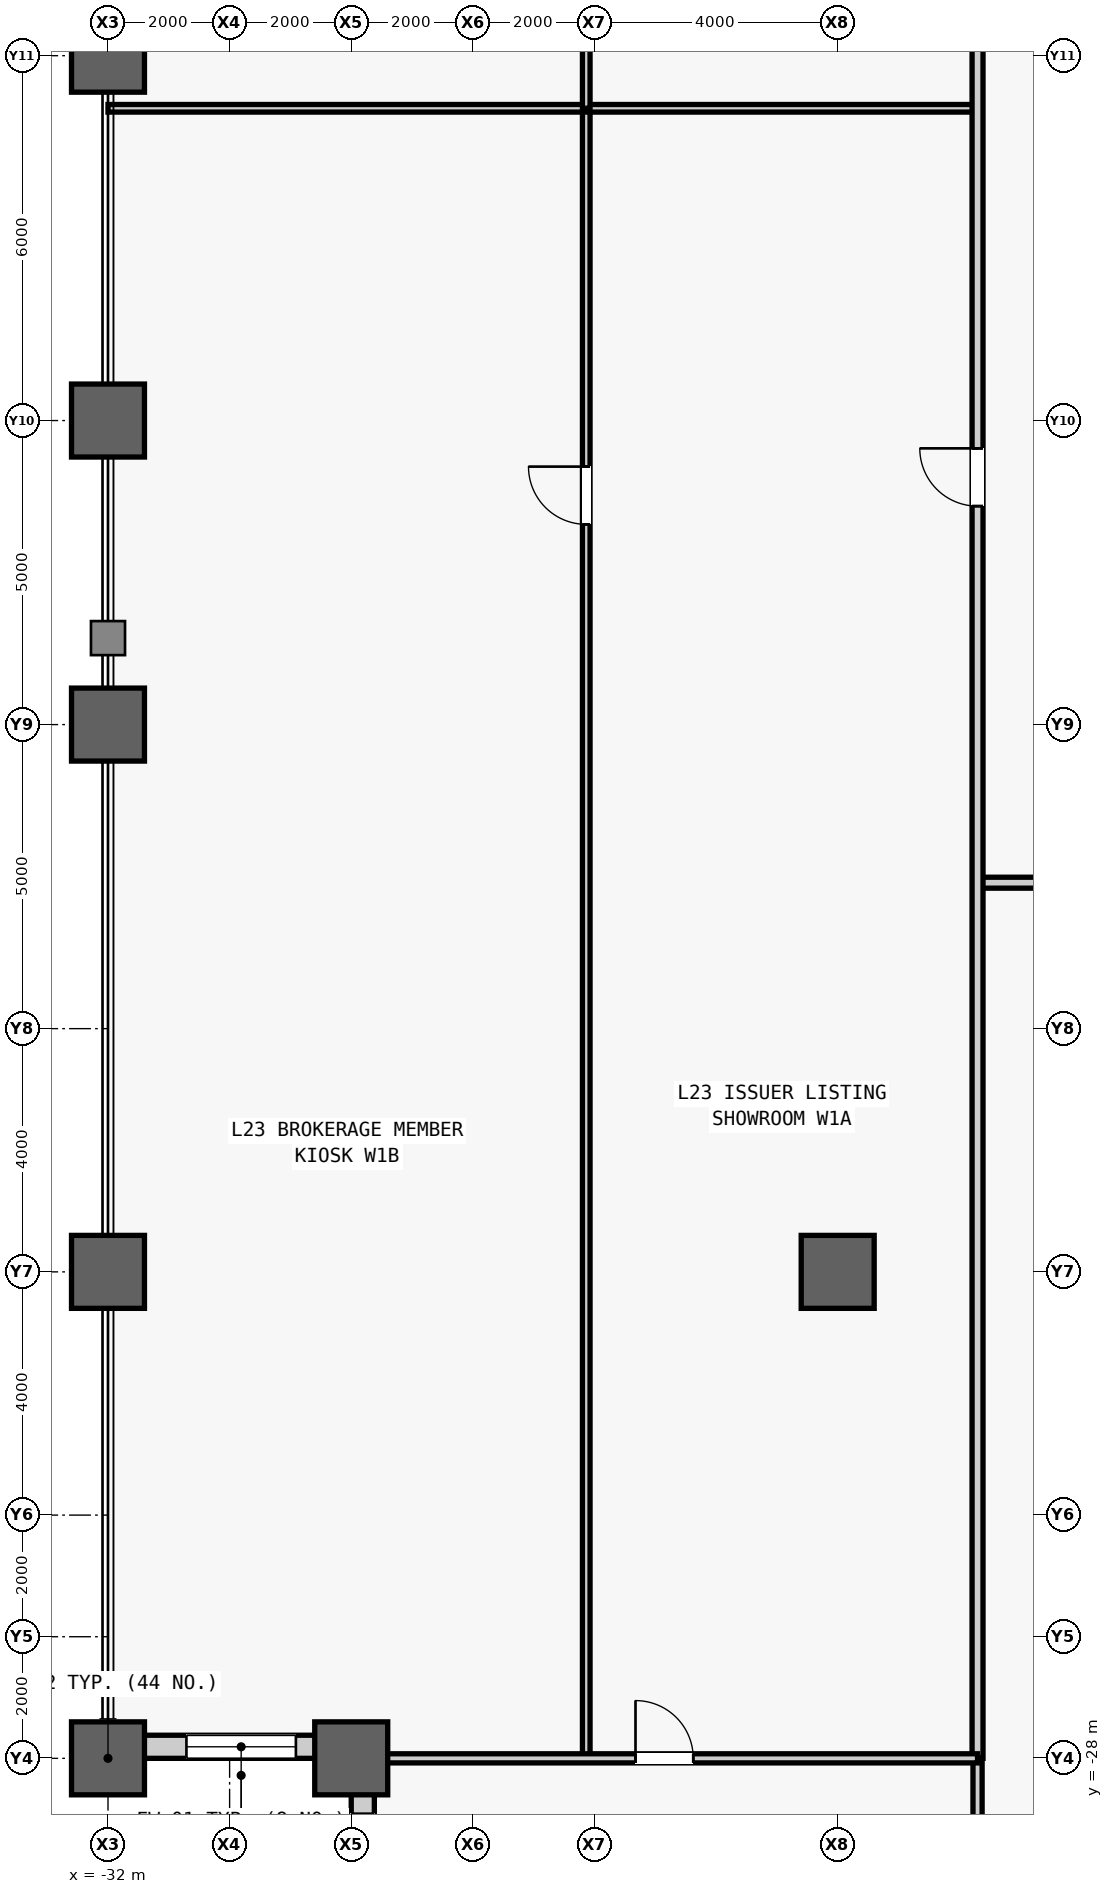
"""IFC4 building model, lengths in metres.
Left out: names, types, materials, properties, quantities, classifications, styles, units other than length and angle.
Written with IfcOpenShell. Run it as: python <this file> out.ifc"""

import sys

from ifc_helpers import new_model, si_unit, direction, frame, frame_2d, origin, origin_2d, place, context, subcontext, project, spatial, rectangle, hollow_rectangle, extrude, source, transform, mapped, element, fill, save


model = new_model("IFC4")
c1 = context("Model", 3, precision=1e-05, world=origin(), true_north=direction((0.0, 1.0)))
c2 = subcontext(c1, "Body", "Model", "MODEL_VIEW")
j1 = project(units=[si_unit("LENGTHUNIT", "METRE"), si_unit("PLANEANGLEUNIT", "RADIAN")], contexts=[c1])
p1 = place(None, origin())
s1 = spatial("IfcSite", under=j1, at=p1, CompositionType="ELEMENT")
p2 = place(p1, origin())
s2 = spatial("IfcBuilding", under=s1, at=p2, CompositionType="ELEMENT")
p3 = place(p2, frame((0.0, 0.0, 103.7)))
s3 = spatial("IfcBuildingStorey", under=s2, at=p3, CompositionType="ELEMENT", Elevation=103.7)
m1 = source(origin(), c2, "Body", "SweptSolid", [
    extrude(hollow_rectangle(XDim=1.2, YDim=1.2, WallThickness=0.07, at=origin_2d()), origin(), (0.0, 0.0, 1.0), 4.1),
])
for number, where, z_axis, x_axis in (
    (1, (-32.0, -28.0, 0.0), (0.0, 0.0, 1.0), (1.0, 0.0, 0.0)),
    (2, (-32.0, -20.0, 0.0), (0.0, 0.0, 1.0), (1.0, 0.0, 0.0)),
    (3, (-32.0, -11.0, 0.0), (0.0, 0.0, 1.0), (1.0, 0.0, 0.0)),
    (4, (-32.0, -6.0, 0.0), (0.0, 0.0, 1.0), (1.0, 0.0, 0.0)),
    (5, (-32.0, 0.0, 0.0), (0.0, 0.0, 1.0), (1.0, 0.0, 0.0)),
    (6, (-28.0, -28.0, 0.0), (0.0, 0.0, 1.0), (1.0, 0.0, 0.0)),
    (7, (-20.0, -20.0, 0.0), (0.0, 0.0, 1.0), (1.0, 0.0, 0.0)),
):
    element("IfcColumn", number, at=place(p3, frame(where, z_axis=z_axis, x_axis=x_axis)), inside=s3, PredefinedType="COLUMN", context=c2, shape_type="MappedRepresentation", body=[
        mapped(m1, transform((0.0, 0.0, 0.0), scale=1.0)),
    ])
m2 = source(origin(), c2, "Body", "SweptSolid", [
    extrude(rectangle(XDim=3.62, YDim=0.38, at=frame_2d((1.81, 0.0))), origin(), (0.0, 0.0, 1.0), 3.145),
])
p4 = place(p3, frame((-28.0, -27.81, 0.0), z_axis=(0.0, 0.0, 1.0), x_axis=(-1.0, 0.0, 0.0)))
e8 = element("IfcWall", 8, at=p4, inside=s3, PredefinedType="STANDARD", context=c2, shape_type="MappedRepresentation", body=[
    mapped(m2, transform((0.0, 0.0, 0.0), scale=1.0)),
])
m3 = source(origin(), c2, "Body", "SweptSolid", [
    extrude(rectangle(XDim=1.8, YDim=2.4, at=frame_2d((0.9, 1.2))), frame((0.0, 0.2, 0.0), z_axis=(0.0, -1.0, 0.0), x_axis=(1.0, 0.0, 0.0)), (0.0, 0.0, 1.0), 0.4),
])
p5 = place(p4, frame((0.91, 0.0, 0.5)))
e9 = element("IfcOpeningElement", 9, at=p5, cuts=e8, PredefinedType="OPENING", context=c2, shape_type="MappedRepresentation", body=[
    mapped(m3, transform((0.0, 0.0, 0.0), scale=1.0)),
])
p6 = place(p3, frame((-27.81, -31.62, 0.0), z_axis=(0.0, 0.0, 1.0), x_axis=(0.0, 1.0, 0.0)))
e10 = element("IfcWall", 10, at=p6, inside=s3, PredefinedType="STANDARD", context=c2, shape_type="MappedRepresentation", body=[
    mapped(m2, transform((0.0, 0.0, 0.0), scale=1.0)),
])
p7 = place(p6, frame((0.91, 0.0, 0.5)))
e11 = element("IfcOpeningElement", 11, at=p7, cuts=e10, PredefinedType="OPENING", context=c2, shape_type="MappedRepresentation", body=[
    mapped(m3, transform((0.0, 0.0, 0.0), scale=1.0)),
])
m4 = source(origin(), c2, "Body", "SweptSolid", [
    extrude(rectangle(XDim=36.25, YDim=0.18, at=frame_2d((18.125, 0.0))), origin(), (0.0, 0.0, 1.0), 3.84),
])
p8 = place(p3, frame((-17.7, -13.6, 0.0), z_axis=(0.0, 0.0, 1.0), x_axis=(1.0, 0.0, 0.0)))
e12 = element("IfcWall", 12, at=p8, inside=s3, PredefinedType="PARTITIONING", context=c2, shape_type="MappedRepresentation", body=[
    mapped(m4, transform((0.0, 0.0, 0.0), scale=1.0)),
])
m5 = source(origin(), c2, "Body", "SweptSolid", [
    extrude(rectangle(XDim=1.05, YDim=2.2, at=frame_2d((0.525, 1.1))), frame((0.0, 0.1, 0.0), z_axis=(0.0, -1.0, 0.0), x_axis=(1.0, 0.0, 0.0)), (0.0, 0.0, 1.0), 0.2),
])
p9 = place(p8, frame((6.925, 0.0, 0.0)))
e13 = element("IfcOpeningElement", 13, at=p9, cuts=e12, PredefinedType="OPENING", context=c2, shape_type="MappedRepresentation", body=[
    mapped(m5, transform((0.0, 0.0, 0.0), scale=1.0)),
])
p10 = place(p8, frame((17.6, 0.0, 0.0)))
e14 = element("IfcOpeningElement", 14, at=p10, cuts=e12, PredefinedType="OPENING", context=c2, shape_type="MappedRepresentation", body=[
    mapped(m5, transform((0.0, 0.0, 0.0), scale=1.0)),
])
p11 = place(p8, frame((27.85, 0.0, 0.0)))
e15 = element("IfcOpeningElement", 15, at=p11, cuts=e12, PredefinedType="OPENING", context=c2, shape_type="MappedRepresentation", body=[
    mapped(m5, transform((0.0, 0.0, 0.0), scale=1.0)),
])
m6 = source(origin(), c2, "Body", "SweptSolid", [
    extrude(rectangle(XDim=4.0, YDim=0.15, at=frame_2d((2.0, 0.0))), origin(), (0.0, 0.0, 1.0), 3.84),
])
p12 = place(p3, frame((-17.7, -32.0, 0.0), z_axis=(0.0, 0.0, 1.0), x_axis=(0.0, 1.0, 0.0)))
e16 = element("IfcWall", 16, at=p12, inside=s3, PredefinedType="PARTITIONING", context=c2, shape_type="MappedRepresentation", body=[
    mapped(m6, transform((0.0, 0.0, 0.0), scale=1.0)),
])
m7 = source(origin(), c2, "Body", "SweptSolid", [
    extrude(rectangle(XDim=27.135, YDim=0.125, at=frame_2d((13.567, 0.0))), origin(), (0.0, 0.0, 1.0), 3.84),
])
p13 = place(p3, frame((-24.135, -28.0, 0.0), z_axis=(0.0, 0.0, 1.0), x_axis=(0.0, 1.0, 0.0)))
e17 = element("IfcWall", 17, at=p13, inside=s3, PredefinedType="PARTITIONING", context=c2, shape_type="MappedRepresentation", body=[
    mapped(m7, transform((0.0, 0.0, 0.0), scale=1.0)),
])
m8 = source(origin(), c2, "Body", "SweptSolid", [
    extrude(rectangle(XDim=0.95, YDim=2.15, at=frame_2d((0.475, 1.075))), frame((0.0, 0.073, 0.0), z_axis=(0.0, -1.0, 0.0), x_axis=(1.0, 0.0, 0.0)), (0.0, 0.0, 1.0), 0.145),
])
p14 = place(p13, frame((20.292, 0.0, 0.0)))
e18 = element("IfcOpeningElement", 18, at=p14, cuts=e17, PredefinedType="OPENING", context=c2, shape_type="MappedRepresentation", body=[
    mapped(m8, transform((0.0, 0.0, 0.0), scale=1.0)),
])
m9 = source(origin(), c2, "Body", "SweptSolid", [
    extrude(rectangle(XDim=14.3, YDim=0.125, at=frame_2d((7.15, 0.0))), origin(), (0.0, 0.0, 1.0), 3.84),
])
p15 = place(p3, frame((-32.0, -0.865, 0.0), z_axis=(0.0, 0.0, 1.0), x_axis=(1.0, 0.0, 0.0)))
e19 = element("IfcWall", 19, at=p15, inside=s3, PredefinedType="PARTITIONING", context=c2, shape_type="MappedRepresentation", body=[
    mapped(m9, transform((0.0, 0.0, 0.0), scale=1.0)),
])
m10 = source(origin(), c2, "Body", "SweptSolid", [
    extrude(rectangle(XDim=28.865, YDim=0.125, at=frame_2d((14.433, 0.0))), origin(), (0.0, 0.0, 1.0), 3.84),
])
p16 = place(p3, frame((-24.135, -0.865, 0.0), z_axis=(0.0, 0.0, 1.0), x_axis=(0.0, 1.0, 0.0)))
e20 = element("IfcWall", 20, at=p16, inside=s3, PredefinedType="PARTITIONING", context=c2, shape_type="MappedRepresentation", body=[
    mapped(m10, transform((0.0, 0.0, 0.0), scale=1.0)),
])
p17 = place(p16, frame((7.308, 0.0, 0.0)))
e21 = element("IfcOpeningElement", 21, at=p17, cuts=e20, PredefinedType="OPENING", context=c2, shape_type="MappedRepresentation", body=[
    mapped(m8, transform((0.0, 0.0, 0.0), scale=1.0)),
])
m11 = source(origin(), c2, "Body", "SweptSolid", [
    extrude(rectangle(XDim=56.0, YDim=0.18, at=frame_2d((28.0, 0.0))), origin(), (0.0, 0.0, 1.0), 3.84),
])
p18 = place(p3, frame((-17.7, -28.0, 0.0), z_axis=(0.0, 0.0, 1.0), x_axis=(0.0, 1.0, 0.0)))
e22 = element("IfcWall", 22, at=p18, inside=s3, PredefinedType="PARTITIONING", context=c2, shape_type="MappedRepresentation", body=[
    mapped(m11, transform((0.0, 0.0, 0.0), scale=1.0)),
])
m12 = source(origin(), c2, "Body", "SweptSolid", [
    extrude(rectangle(XDim=0.95, YDim=2.15, at=frame_2d((0.475, 1.075))), frame((0.0, 0.1, 0.0), z_axis=(0.0, -1.0, 0.0), x_axis=(1.0, 0.0, 0.0)), (0.0, 0.0, 1.0), 0.2),
])
p19 = place(p18, frame((20.593, 0.0, 0.0)))
e23 = element("IfcOpeningElement", 23, at=p19, cuts=e22, PredefinedType="OPENING", context=c2, shape_type="MappedRepresentation", body=[
    mapped(m12, transform((0.0, 0.0, 0.0), scale=1.0)),
])
p20 = place(p18, frame((34.143, 0.0, 0.0)))
e24 = element("IfcOpeningElement", 24, at=p20, cuts=e22, PredefinedType="OPENING", context=c2, shape_type="MappedRepresentation", body=[
    mapped(m12, transform((0.0, 0.0, 0.0), scale=1.0)),
])
m13 = source(origin(), c2, "Body", "SweptSolid", [
    extrude(rectangle(XDim=10.3, YDim=0.15, at=frame_2d((5.15, 0.0))), origin(), (0.0, 0.0, 1.0), 3.84),
])
p21 = place(p3, frame((-28.0, -28.0, 0.0), z_axis=(0.0, 0.0, 1.0), x_axis=(1.0, 0.0, 0.0)))
e25 = element("IfcWall", 25, at=p21, inside=s3, PredefinedType="PARTITIONING", context=c2, shape_type="MappedRepresentation", body=[
    mapped(m13, transform((0.0, 0.0, 0.0), scale=1.0)),
])
m14 = source(origin(), c2, "Body", "SweptSolid", [
    extrude(rectangle(XDim=0.95, YDim=2.15, at=frame_2d((0.475, 1.075))), frame((0.0, 0.085, 0.0), z_axis=(0.0, -1.0, 0.0), x_axis=(1.0, 0.0, 0.0)), (0.0, 0.0, 1.0), 0.17),
])
p22 = place(p21, frame((4.675, 0.0, 0.0)))
e26 = element("IfcOpeningElement", 26, at=p22, cuts=e25, PredefinedType="OPENING", context=c2, shape_type="MappedRepresentation", body=[
    mapped(m14, transform((0.0, 0.0, 0.0), scale=1.0)),
])
m15 = source(origin(), c2, "Body", "SweptSolid", [
    extrude(rectangle(XDim=1.8, YDim=2.4, at=frame_2d((0.9, 1.2))), frame((0.0, 0.03, 0.0), z_axis=(0.0, -1.0, 0.0), x_axis=(1.0, 0.0, 0.0)), (0.0, 0.0, 1.0), 0.06),
])
p23 = place(p5, origin())
e27 = element("IfcWindow", 27, at=p23, inside=s3, PartitioningType="SINGLE_PANEL", PredefinedType="WINDOW", context=c2, shape_type="MappedRepresentation", body=[
    mapped(m15, transform((0.0, 0.0, 0.0), scale=1.0)),
])
fill(e9, e27)
p24 = place(p7, origin())
e28 = element("IfcWindow", 28, at=p24, inside=s3, PartitioningType="SINGLE_PANEL", PredefinedType="WINDOW", context=c2, shape_type="MappedRepresentation", body=[
    mapped(m15, transform((0.0, 0.0, 0.0), scale=1.0)),
])
fill(e11, e28)
m16 = source(origin(), c2, "Body", "SweptSolid", [
    extrude(rectangle(XDim=0.95, YDim=2.15, at=frame_2d((0.475, 1.075))), frame((0.0, 0.025, 0.0), z_axis=(0.0, -1.0, 0.0), x_axis=(1.0, 0.0, 0.0)), (0.0, 0.0, 1.0), 0.05),
])
p25 = place(p14, origin())
e29 = element("IfcDoor", 29, at=p25, inside=s3, OperationType="SINGLE_SWING_RIGHT", PredefinedType="DOOR", context=c2, shape_type="MappedRepresentation", body=[
    mapped(m16, transform((0.0, 0.0, 0.0), scale=1.0)),
])
fill(e18, e29)
p26 = place(p19, origin())
e30 = element("IfcDoor", 30, at=p26, inside=s3, OperationType="SINGLE_SWING_RIGHT", PredefinedType="DOOR", context=c2, shape_type="MappedRepresentation", body=[
    mapped(m16, transform((0.0, 0.0, 0.0), scale=1.0)),
])
fill(e23, e30)
p27 = place(p22, origin())
e31 = element("IfcDoor", 31, at=p27, inside=s3, OperationType="SINGLE_SWING_LEFT", PredefinedType="DOOR", context=c2, shape_type="MappedRepresentation", body=[
    mapped(m16, transform((0.0, 0.0, 0.0), scale=1.0)),
])
fill(e26, e31)
save(model, sys.argv[1])
